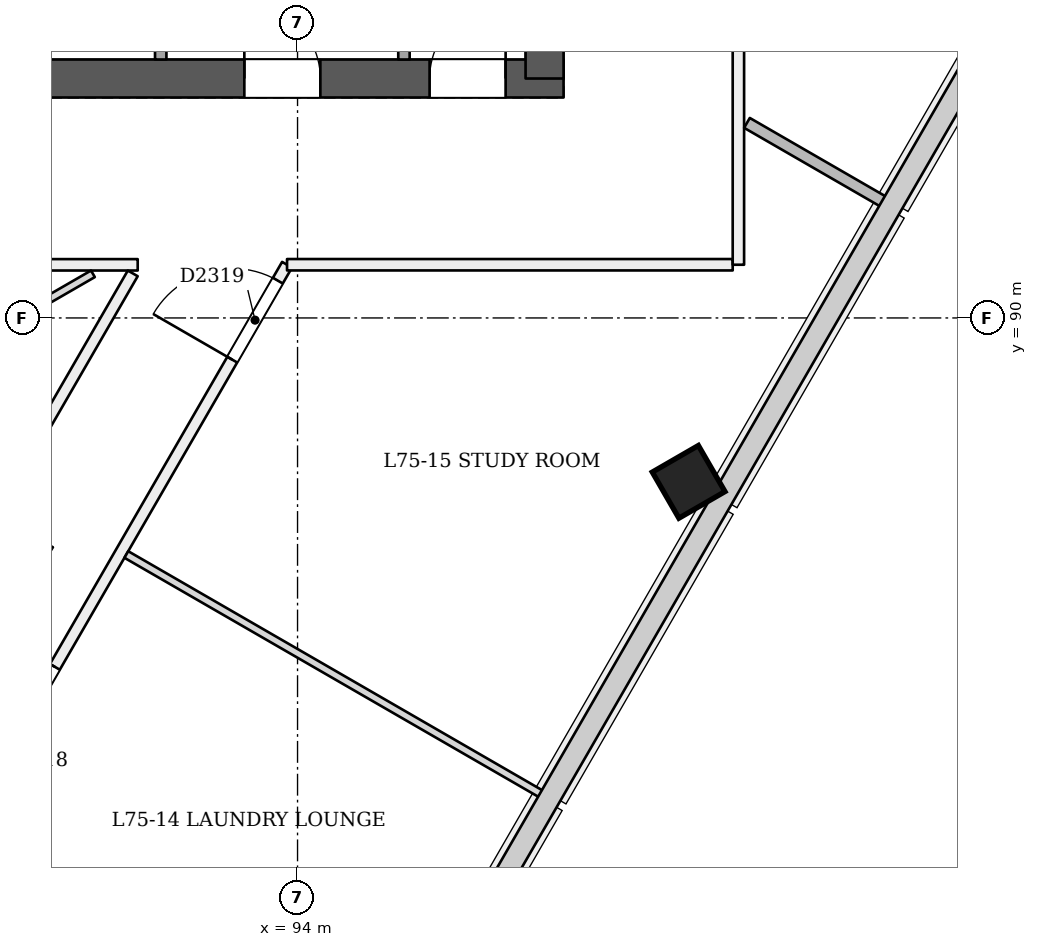
"""IFC4 building model, lengths in metres.
Left out: names, types, materials, properties, quantities, classifications, styles, units other than length and angle.
Written with IfcOpenShell. Run it as: python <this file> out.ifc"""

import sys

from ifc_helpers import new_model, si_unit, direction, frame, frame_2d, origin, origin_2d, place, context, subcontext, project, spatial, rectangle, extrude, element, fill, save


model = new_model("IFC4")
c1 = context("Model", 3, precision=1e-05, world=origin(), true_north=direction((0.0, 1.0)))
c2 = subcontext(c1, "Body", "Model", "MODEL_VIEW")
j1 = project(units=[si_unit("LENGTHUNIT", "METRE"), si_unit("PLANEANGLEUNIT", "RADIAN")], contexts=[c1])
p1 = place(None, origin())
s1 = spatial("IfcSite", under=j1, at=p1, CompositionType="ELEMENT")
p2 = place(p1, origin())
s2 = spatial("IfcBuilding", under=s1, at=p2, CompositionType="ELEMENT")
p3 = place(p2, frame((0.0, 0.0, 291.4)))
s3 = spatial("IfcBuildingStorey", under=s2, at=p3, CompositionType="ELEMENT", Elevation=291.4)
p4 = place(p3, frame((72.75, 93.15, 0.0), z_axis=(0.0, 0.0, 1.0), x_axis=(1.0, 0.0, 0.0)))
e1 = element("IfcWall", 1, at=p4, inside=s3, PredefinedType="SHEAR", context=c2, shape_type="SweptSolid", body=[
    extrude(rectangle(XDim=24.75, YDim=0.5, at=frame_2d((12.375, 0.0))), origin(), (0.0, 0.0, 1.0), 3.6),
])
p5 = place(p4, frame((1.05, 0.0, 0.0)))
e2 = element("IfcOpeningElement", 2, at=p5, cuts=e1, PredefinedType="OPENING", context=c2, shape_type="SweptSolid", body=[
    extrude(rectangle(XDim=1.2, YDim=2.1, at=frame_2d((0.6, 1.05))), frame((0.0, 0.26, 0.0), z_axis=(0.0, -1.0, 0.0), x_axis=(1.0, 0.0, 0.0)), (0.0, 0.0, 1.0), 0.521),
])
p6 = place(p4, frame((3.25, 0.0, 0.0)))
e3 = element("IfcOpeningElement", 3, at=p6, cuts=e1, PredefinedType="OPENING", context=c2, shape_type="SweptSolid", body=[
    extrude(rectangle(XDim=1.2, YDim=2.1, at=frame_2d((0.6, 1.05))), frame((0.0, 0.26, 0.0), z_axis=(0.0, -1.0, 0.0), x_axis=(1.0, 0.0, 0.0)), (0.0, 0.0, 1.0), 0.521),
])
p7 = place(p4, frame((13.25, 0.0, 0.0)))
e4 = element("IfcOpeningElement", 4, at=p7, cuts=e1, PredefinedType="OPENING", context=c2, shape_type="SweptSolid", body=[
    extrude(rectangle(XDim=1.2, YDim=2.1, at=frame_2d((0.6, 1.05))), frame((0.0, 0.26, 0.0), z_axis=(0.0, -1.0, 0.0), x_axis=(1.0, 0.0, 0.0)), (0.0, 0.0, 1.0), 0.521),
])
p8 = place(p4, frame((16.663, 0.0, 0.0)))
e5 = element("IfcOpeningElement", 5, at=p8, cuts=e1, PredefinedType="OPENING", context=c2, shape_type="SweptSolid", body=[
    extrude(rectangle(XDim=1.0, YDim=2.1, at=frame_2d((0.5, 1.05))), frame((0.0, 0.26, 0.0), z_axis=(0.0, -1.0, 0.0), x_axis=(1.0, 0.0, 0.0)), (0.0, 0.0, 1.0), 0.521),
])
p9 = place(p4, frame((20.55, 0.0, 0.0)))
e6 = element("IfcOpeningElement", 6, at=p9, cuts=e1, PredefinedType="OPENING", context=c2, shape_type="SweptSolid", body=[
    extrude(rectangle(XDim=1.0, YDim=2.1, at=frame_2d((0.5, 1.05))), frame((0.0, 0.26, 0.0), z_axis=(0.0, -1.0, 0.0), x_axis=(1.0, 0.0, 0.0)), (0.0, 0.0, 1.0), 0.521),
])
p10 = place(p4, frame((22.988, 0.0, 0.0)))
e7 = element("IfcOpeningElement", 7, at=p10, cuts=e1, PredefinedType="OPENING", context=c2, shape_type="SweptSolid", body=[
    extrude(rectangle(XDim=1.0, YDim=2.1, at=frame_2d((0.5, 1.05))), frame((0.0, 0.26, 0.0), z_axis=(0.0, -1.0, 0.0), x_axis=(1.0, 0.0, 0.0)), (0.0, 0.0, 1.0), 0.521),
])
p11 = place(p3, frame((97.25, 93.15, 0.0), z_axis=(0.0, 0.0, 1.0), x_axis=(0.0, 1.0, 0.0)))
e8 = element("IfcWall", 8, at=p11, inside=s3, PredefinedType="SHEAR", context=c2, shape_type="SweptSolid", body=[
    extrude(rectangle(XDim=10.75, YDim=0.5, at=frame_2d((5.375, 0.0))), origin(), (0.0, 0.0, 1.0), 3.6),
])
p12 = place(p3, frame((99.172, 87.798, 0.0), z_axis=(-0.022216970636, 0.038436722204, 0.999014026229), x_axis=(-0.499812852485, -0.865848926395, 0.022197953788)))
e9 = element("IfcColumn", 9, at=p12, inside=s3, PredefinedType="COLUMN", context=c2, shape_type="SweptSolid", body=[
    extrude(rectangle(XDim=0.7, YDim=0.7, at=origin_2d()), origin(), (0.0, 0.0, 1.0), 3.582),
])
p13 = place(p3, frame((78.103, 90.699, 0.0), z_axis=(0.0, 0.0, 1.0), x_axis=(1.0, 0.0, 0.0)))
e10 = element("IfcWall", 10, at=p13, inside=s3, PredefinedType="PARTITIONING", context=c2, shape_type="SweptSolid", body=[
    extrude(rectangle(XDim=13.794, YDim=0.15, at=frame_2d((6.897, 0.0))), origin(), (0.0, 0.0, 1.0), 3.2),
])
p14 = place(p13, frame((8.49, 0.0, 0.0)))
e11 = element("IfcOpeningElement", 11, at=p14, cuts=e10, PredefinedType="OPENING", context=c2, shape_type="SweptSolid", body=[
    extrude(rectangle(XDim=0.9, YDim=2.1, at=frame_2d((0.45, 1.05))), frame((0.0, 0.085, 0.0), z_axis=(0.0, -1.0, 0.0), x_axis=(1.0, 0.0, 0.0)), (0.0, 0.0, 1.0), 0.171),
])
p15 = place(p13, frame((3.411, 0.0, 0.0)))
e12 = element("IfcOpeningElement", 12, at=p15, cuts=e10, PredefinedType="OPENING", context=c2, shape_type="SweptSolid", body=[
    extrude(rectangle(XDim=1.0, YDim=2.1, at=frame_2d((0.5, 1.05))), frame((0.0, 0.085, 0.0), z_axis=(0.0, -1.0, 0.0), x_axis=(1.0, 0.0, 0.0)), (0.0, 0.0, 1.0), 0.171),
])
p16 = place(p3, frame((91.832, 90.586, 0.0), z_axis=(0.0, 0.0, 1.0), x_axis=(-0.499999877243, -0.866025474658, 0.0)))
e13 = element("IfcWall", 13, at=p16, inside=s3, PredefinedType="PARTITIONING", context=c2, shape_type="SweptSolid", body=[
    extrude(rectangle(XDim=13.534, YDim=0.15, at=frame_2d((6.767, 0.0))), origin(), (0.0, 0.0, 1.0), 3.2),
])
p17 = place(p16, frame((3.646, 0.0, 0.0)))
e14 = element("IfcOpeningElement", 14, at=p17, cuts=e13, PredefinedType="OPENING", context=c2, shape_type="SweptSolid", body=[
    extrude(rectangle(XDim=0.9, YDim=2.1, at=frame_2d((0.45, 1.05))), frame((0.0, 0.085, 0.0), z_axis=(0.0, -1.0, 0.0), x_axis=(1.0, 0.0, 0.0)), (0.0, 0.0, 1.0), 0.171),
])
p18 = place(p3, frame((85.0, 75.351, 0.0), z_axis=(0.0, 0.0, 1.0), x_axis=(0.499999881977, 0.866025471925, 0.0)))
e15 = element("IfcWall", 15, at=p18, inside=s3, PredefinedType="PARTITIONING", context=c2, shape_type="SweptSolid", body=[
    extrude(rectangle(XDim=17.724, YDim=0.15, at=frame_2d((8.862, 0.0))), origin(), (0.0, 0.0, 1.0), 2.8),
])
p19 = place(p18, frame((2.645, 0.0, 0.0)))
e16 = element("IfcOpeningElement", 16, at=p19, cuts=e15, PredefinedType="OPENING", context=c2, shape_type="SweptSolid", body=[
    extrude(rectangle(XDim=1.0, YDim=2.1, at=frame_2d((0.5, 1.05))), frame((0.0, 0.085, 0.0), z_axis=(0.0, -1.0, 0.0), x_axis=(1.0, 0.0, 0.0)), (0.0, 0.0, 1.0), 0.171),
])
p20 = place(p18, frame((6.115, 0.0, 0.0)))
e17 = element("IfcOpeningElement", 17, at=p20, cuts=e15, PredefinedType="OPENING", context=c2, shape_type="SweptSolid", body=[
    extrude(rectangle(XDim=1.0, YDim=2.1, at=frame_2d((0.5, 1.05))), frame((0.0, 0.085, 0.0), z_axis=(0.0, -1.0, 0.0), x_axis=(1.0, 0.0, 0.0)), (0.0, 0.0, 1.0), 0.171),
])
p21 = place(p18, frame((10.615, 0.0, 0.0)))
e18 = element("IfcOpeningElement", 18, at=p21, cuts=e15, PredefinedType="OPENING", context=c2, shape_type="SweptSolid", body=[
    extrude(rectangle(XDim=1.0, YDim=2.1, at=frame_2d((0.5, 1.05))), frame((0.0, 0.085, 0.0), z_axis=(0.0, -1.0, 0.0), x_axis=(1.0, 0.0, 0.0)), (0.0, 0.0, 1.0), 0.171),
])
p22 = place(p18, frame((16.282, 0.0, 0.0)))
e19 = element("IfcOpeningElement", 19, at=p22, cuts=e15, PredefinedType="OPENING", context=c2, shape_type="SweptSolid", body=[
    extrude(rectangle(XDim=1.2, YDim=2.1, at=frame_2d((0.6, 1.05))), frame((0.0, 0.085, 0.0), z_axis=(0.0, -1.0, 0.0), x_axis=(1.0, 0.0, 0.0)), (0.0, 0.0, 1.0), 0.171),
])
p23 = place(p3, frame((93.862, 90.7, 0.0), z_axis=(0.0, 0.0, 1.0), x_axis=(1.0, 0.0, 0.0)))
e20 = element("IfcWall", 20, at=p23, inside=s3, PredefinedType="PARTITIONING", context=c2, shape_type="SweptSolid", body=[
    extrude(rectangle(XDim=5.863, YDim=0.15, at=frame_2d((2.932, 0.0))), origin(), (0.0, 0.0, 1.0), 3.2),
])
p24 = place(p3, frame((99.8, 90.7, 0.0), z_axis=(0.0, 0.0, 1.0), x_axis=(0.0, 1.0, 0.0)))
e21 = element("IfcWall", 21, at=p24, inside=s3, PredefinedType="PARTITIONING", context=c2, shape_type="SweptSolid", body=[
    extrude(rectangle(XDim=8.628, YDim=0.15, at=frame_2d((4.314, 0.0))), origin(), (0.0, 0.0, 1.0), 3.2),
])
p25 = place(p24, frame((3.396, 0.0, 0.0)))
e22 = element("IfcOpeningElement", 22, at=p25, cuts=e21, PredefinedType="OPENING", context=c2, shape_type="SweptSolid", body=[
    extrude(rectangle(XDim=1.0, YDim=2.1, at=frame_2d((0.5, 1.05))), frame((0.0, 0.085, 0.0), z_axis=(0.0, -1.0, 0.0), x_axis=(1.0, 0.0, 0.0)), (0.0, 0.0, 1.0), 0.171),
])
p26 = place(p24, frame((7.428, 0.0, 0.0)))
e23 = element("IfcOpeningElement", 23, at=p26, cuts=e21, PredefinedType="OPENING", context=c2, shape_type="SweptSolid", body=[
    extrude(rectangle(XDim=1.0, YDim=2.1, at=frame_2d((0.5, 1.05))), frame((0.0, 0.085, 0.0), z_axis=(0.0, -1.0, 0.0), x_axis=(1.0, 0.0, 0.0)), (0.0, 0.0, 1.0), 0.171),
])
p27 = place(p3, frame((84.791, 86.818, 0.0), z_axis=(0.0, 0.0, 1.0), x_axis=(0.866016489654, 0.500015439409, 0.0)))
e24 = element("IfcWall", 24, at=p27, inside=s3, PredefinedType="PARTITIONING", context=c2, shape_type="SweptSolid", body=[
    extrude(rectangle(XDim=7.526, YDim=0.1, at=frame_2d((3.763, 0.0))), origin(), (0.0, 0.0, 1.0), 3.2),
])
p28 = place(p3, frame((94.975, 79.828, 0.0), z_axis=(0.0, 0.0, 1.0), x_axis=(-0.866032601554, 0.49998753289, 0.0)))
e25 = element("IfcWall", 25, at=p28, inside=s3, PredefinedType="PARTITIONING", context=c2, shape_type="SweptSolid", body=[
    extrude(rectangle(XDim=6.325, YDim=0.1, at=frame_2d((3.163, 0.0))), origin(), (0.0, 0.0, 1.0), 2.7),
])
p29 = place(p3, frame((97.243, 83.715, 0.0), z_axis=(0.0, 0.0, 1.0), x_axis=(-0.866025401434, 0.500000004071, 0.0)))
e26 = element("IfcWall", 26, at=p29, inside=s3, PredefinedType="PARTITIONING", context=c2, shape_type="SweptSolid", body=[
    extrude(rectangle(XDim=6.345, YDim=0.1, at=frame_2d((3.173, 0.0))), origin(), (0.0, 0.0, 1.0), 2.7),
])
p30 = place(p3, frame((101.743, 91.51, 0.0), z_axis=(0.0, 0.0, 1.0), x_axis=(-0.866016279763, 0.500015802937, 0.0)))
e27 = element("IfcWall", 27, at=p30, inside=s3, PredefinedType="PARTITIONING", context=c2, shape_type="SweptSolid", body=[
    extrude(rectangle(XDim=2.113, YDim=0.15, at=frame_2d((1.057, 0.0))), origin(), (0.0, 0.0, 1.0), 2.7),
])
for number, where, z_axis, x_axis in (
    (28, (92.2, 93.4, 0.0), (0.0, 0.0, 1.0), (0.0, 1.0, 0.0)),
    (29, (95.4, 93.4, 0.0), (0.0, 0.0, 1.0), (0.0, 1.0, 0.0)),
):
    element("IfcWall", number, at=place(p3, frame(where, z_axis=z_axis, x_axis=x_axis)), inside=s3, PredefinedType="PARTITIONING", context=c2, shape_type="SweptSolid", body=[
        extrude(rectangle(XDim=3.3, YDim=0.15, at=frame_2d((1.65, 0.0))), origin(), (0.0, 0.0, 1.0), 3.2),
    ])
p31 = place(p21, origin())
e30 = element("IfcDoor", 30, at=p31, inside=s3, OperationType="SINGLE_SWING_RIGHT", PredefinedType="NOTDEFINED", context=c2, shape_type="SweptSolid", body=[
    extrude(rectangle(XDim=1.0, YDim=2.1, at=frame_2d((0.5, 1.05))), frame((0.0, 0.025, 0.0), z_axis=(0.0, -1.0, 0.0), x_axis=(1.0, 0.0, 0.0)), (0.0, 0.0, 1.0), 0.05),
])
fill(e18, e30)
p32 = place(p22, origin())
e31 = element("IfcDoor", 31, at=p32, inside=s3, OperationType="SINGLE_SWING_LEFT", PredefinedType="NOTDEFINED", context=c2, shape_type="SweptSolid", body=[
    extrude(rectangle(XDim=1.2, YDim=2.1, at=frame_2d((0.6, 1.05))), frame((0.0, 0.025, 0.0), z_axis=(0.0, -1.0, 0.0), x_axis=(1.0, 0.0, 0.0)), (0.0, 0.0, 1.0), 0.05),
])
fill(e19, e31)
p33 = place(p9, origin())
e32 = element("IfcDoor", 32, at=p33, inside=s3, OperationType="SINGLE_SWING_LEFT", PredefinedType="NOTDEFINED", context=c2, shape_type="SweptSolid", body=[
    extrude(rectangle(XDim=1.0, YDim=2.1, at=frame_2d((0.5, 1.05))), frame((0.0, 0.025, 0.0), z_axis=(0.0, -1.0, 0.0), x_axis=(1.0, 0.0, 0.0)), (0.0, 0.0, 1.0), 0.05),
])
fill(e6, e32)
p34 = place(p10, origin())
e33 = element("IfcDoor", 33, at=p34, inside=s3, OperationType="SINGLE_SWING_RIGHT", PredefinedType="NOTDEFINED", context=c2, shape_type="SweptSolid", body=[
    extrude(rectangle(XDim=1.0, YDim=2.1, at=frame_2d((0.5, 1.05))), frame((0.0, 0.025, 0.0), z_axis=(0.0, -1.0, 0.0), x_axis=(1.0, 0.0, 0.0)), (0.0, 0.0, 1.0), 0.05),
])
fill(e7, e33)
save(model, sys.argv[1])
